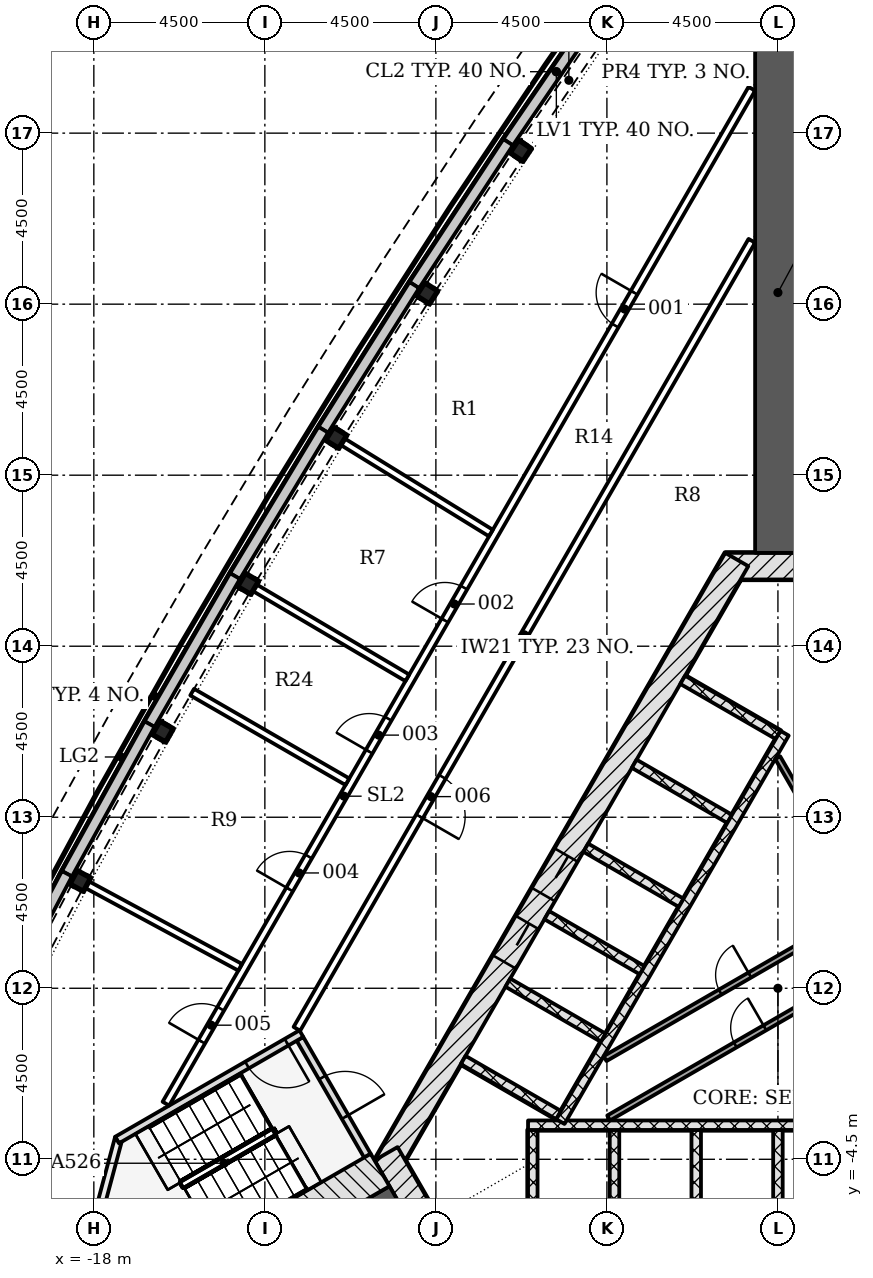
"""IFC4 building model, lengths in metres.
Left out: names, types, materials, properties, quantities, classifications, styles, units other than length and angle.
Written with IfcOpenShell. Run it as: python <this file> out.ifc"""

import sys

from ifc_helpers import new_model, si_unit, direction, frame, frame_2d, origin, origin_2d, place, context, subcontext, project, spatial, polyline, rectangle, i_section, outline, extrude, element, fill, save


model = new_model("IFC4")
c1 = context("Model", 3, precision=1e-05, world=origin(), true_north=direction((0.0, 1.0)))
c2 = subcontext(c1, "Body", "Model", "MODEL_VIEW")
j1 = project(units=[si_unit("LENGTHUNIT", "METRE"), si_unit("PLANEANGLEUNIT", "RADIAN")], contexts=[c1])
p1 = place(None, origin())
s1 = spatial("IfcSite", under=j1, at=p1, CompositionType="ELEMENT")
p2 = place(p1, origin())
s2 = spatial("IfcBuilding", under=s1, at=p2, CompositionType="ELEMENT")
p3 = place(p2, frame((0.0, 0.0, 52.8)))
s3 = spatial("IfcBuildingStorey", under=s2, at=p3, CompositionType="ELEMENT", Elevation=52.8)
p4 = place(p3, frame((1.386, 11.106, -0.3), z_axis=(0.0, 0.0, 1.0), x_axis=(-1.0, 0.0, 0.0)))
e1 = element("IfcWall", 1, at=p4, inside=s3, PredefinedType="SHEAR", context=c2, shape_type="SweptSolid", body=[
    extrude(rectangle(XDim=2.771, YDim=0.7, at=frame_2d((1.386, 0.0))), origin(), (0.0, 0.0, 1.0), 5.5),
])
p5 = place(p3, frame((-1.083, 11.281, -0.3), z_axis=(0.0, 0.0, 1.0), x_axis=(-0.500001446645, -0.866024568562, 0.0)))
e2 = element("IfcWall", 2, at=p5, inside=s3, PredefinedType="SHEAR", context=c2, shape_type="SweptSolid", body=[
    extrude(rectangle(XDim=18.458, YDim=0.7, at=frame_2d((9.229, 0.0))), origin(), (0.0, 0.0, 1.0), 5.5),
])
p6 = place(p5, frame((8.979, 0.0, 0.3)))
e3 = element("IfcOpeningElement", 3, at=p6, cuts=e2, PredefinedType="OPENING", context=c2, shape_type="SweptSolid", body=[
    extrude(rectangle(XDim=1.2, YDim=2.1, at=frame_2d((0.6, 1.05))), frame((0.0, 0.36, 0.0), z_axis=(0.0, -1.0, 0.0), x_axis=(1.0, 0.0, 0.0)), (0.0, 0.0, 1.0), 0.72),
])
p7 = place(p5, frame((11.029, 0.0, 0.3)))
e4 = element("IfcOpeningElement", 4, at=p7, cuts=e2, PredefinedType="OPENING", context=c2, shape_type="SweptSolid", body=[
    extrude(rectangle(XDim=1.2, YDim=2.1, at=frame_2d((0.6, 1.05))), frame((0.0, 0.36, 0.0), z_axis=(0.0, -1.0, 0.0), x_axis=(1.0, 0.0, 0.0)), (0.0, 0.0, 1.0), 0.72),
])
p8 = place(p3, frame((-10.311, -4.353, -0.3), z_axis=(0.0, 0.0, 1.0), x_axis=(0.500042739161, -0.866000726912, 0.0)))
e5 = element("IfcWall", 5, at=p8, inside=s3, PredefinedType="SHEAR", context=c2, shape_type="SweptSolid", body=[
    extrude(rectangle(XDim=2.771, YDim=0.7, at=frame_2d((1.386, 0.0))), origin(), (0.0, 0.0, 1.0), 5.5),
])
p9 = place(p3, frame((0.0, 11.456, -0.3), z_axis=(0.0, 0.0, 1.0), x_axis=(0.0, 1.0, 0.0)))
e6 = element("IfcWall", 6, at=p9, inside=s3, PredefinedType="SHEAR", context=c2, shape_type="SweptSolid", body=[
    extrude(rectangle(XDim=13.699, YDim=1.2, at=frame_2d((6.849, 0.0))), origin(), (0.0, 0.0, 1.0), 5.5),
])
p10 = place(p3, frame((-9.922, -5.728, -0.3), z_axis=(0.0, 0.0, 1.0), x_axis=(-0.866030067197, -0.499991922645, 0.0)))
e7 = element("IfcWall", 7, at=p10, inside=s3, PredefinedType="SHEAR", context=c2, shape_type="SweptSolid", body=[
    extrude(rectangle(XDim=13.698, YDim=1.2, at=frame_2d((6.849, 0.0))), origin(), (0.0, 0.0, 1.0), 5.5),
])
for number, where, z_axis, x_axis in (
    (8, (-6.768, 22.038, -0.3), (0.0, 0.0, 1.0), (-0.557, -0.831, 0.0)),
    (9, (-9.231, 18.285, -0.3), (0.0, 0.0, 1.0), (-0.541, -0.841, 0.0)),
    (10, (-11.623, 14.485, -0.3), (0.0, 0.0, 1.0), (-0.525, -0.851, 0.0)),
    (11, (-13.941, 10.641, -0.3), (0.0, 0.0, 1.0), (-0.508, -0.861, 0.0)),
    (12, (-16.186, 6.753, -0.3), (0.0, 0.0, 1.0), (-0.492, -0.871, 0.0)),
    (13, (-18.356, 2.823, -0.3), (0.0, 0.0, 1.0), (-0.475, -0.88, 0.0)),
):
    element("IfcColumn", number, at=place(p3, frame(where, z_axis=z_axis, x_axis=x_axis)), inside=s3, PredefinedType="COLUMN", context=c2, shape_type="SweptSolid", body=[
        extrude(i_section(OverallWidth=0.404, OverallDepth=0.406, WebThickness=0.027, FlangeThickness=0.044, FilletRadius=0.015, at=origin_2d()), origin(), (0.0, 0.0, 1.0), 5.5),
    ])
p11 = place(p3, origin())
e14 = element("IfcWall", 14, at=p11, inside=s3, PredefinedType="NOTDEFINED", context=c2, shape_type="SweptSolid", body=[
    extrude(outline(polyline([(-4.684, 26.058), (-7.225, 22.344), (-6.977, 22.175), (-4.436, 25.889), (-4.684, 26.058)])), origin(), (0.0, 0.0, 1.0), 1.2),
])
p12 = place(p3, origin())
e15 = element("IfcWall", 15, at=p12, inside=s3, PredefinedType="NOTDEFINED", context=c2, shape_type="SweptSolid", body=[
    extrude(outline(polyline([(-7.225, 22.344), (-9.694, 18.582), (-9.443, 18.418), (-6.974, 22.179), (-7.225, 22.344)])), origin(), (0.0, 0.0, 1.0), 1.2),
])
p13 = place(p3, origin())
e16 = element("IfcWall", 16, at=p13, inside=s3, PredefinedType="NOTDEFINED", context=c2, shape_type="SweptSolid", body=[
    extrude(outline(polyline([(-9.694, 18.582), (-12.091, 14.774), (-11.837, 14.614), (-9.44, 18.422), (-9.694, 18.582)])), origin(), (0.0, 0.0, 1.0), 1.2),
])
p14 = place(p3, origin())
e17 = element("IfcWall", 17, at=p14, inside=s3, PredefinedType="NOTDEFINED", context=c2, shape_type="SweptSolid", body=[
    extrude(outline(polyline([(-12.091, 14.774), (-14.415, 10.921), (-14.158, 10.766), (-11.834, 14.619), (-12.091, 14.774)])), origin(), (0.0, 0.0, 1.0), 1.2),
])
p15 = place(p3, origin())
e18 = element("IfcWall", 18, at=p15, inside=s3, PredefinedType="NOTDEFINED", context=c2, shape_type="SweptSolid", body=[
    extrude(outline(polyline([(-14.415, 10.921), (-16.665, 7.023), (-16.405, 6.874), (-14.155, 10.771), (-14.415, 10.921)])), origin(), (0.0, 0.0, 1.0), 1.2),
])
p16 = place(p3, origin())
e19 = element("IfcWall", 19, at=p16, inside=s3, PredefinedType="NOTDEFINED", context=c2, shape_type="SweptSolid", body=[
    extrude(outline(polyline([(-16.665, 7.023), (-18.84, 3.084), (-18.578, 2.939), (-16.402, 6.878), (-16.665, 7.023)])), origin(), (0.0, 0.0, 1.0), 1.2),
])
p17 = place(p3, origin())
e20 = element("IfcWall", 20, at=p17, inside=s3, PredefinedType="NOTDEFINED", context=c2, shape_type="SweptSolid", body=[
    extrude(outline(polyline([(-18.84, 3.084), (-20.94, -0.896), (-20.674, -1.036), (-18.575, 2.944), (-18.84, 3.084)])), origin(), (0.0, 0.0, 1.0), 1.2),
])
for number, where, z_axis, x_axis in (
    (21, (-6.45, -6.228, -0.3), (0.0, 0.0, 1.0), (0.0, 1.0, 0.0)),
    (22, (-4.3, -6.228, -0.3), (0.0, 0.0, 1.0), (0.0, 1.0, 0.0)),
    (23, (-2.15, -6.228, -0.3), (0.0, 0.0, 1.0), (0.0, 1.0, 0.0)),
    (24, (0.0, -6.228, -0.3), (0.0, 0.0, 1.0), (0.0, 1.0, 0.0)),
):
    element("IfcWall", number, at=place(p3, frame(where, z_axis=z_axis, x_axis=x_axis)), inside=s3, PredefinedType="PARTITIONING", context=c2, shape_type="SweptSolid", body=[
        extrude(rectangle(XDim=2.5, YDim=0.25, at=frame_2d((1.25, 0.0))), origin(), (0.0, 0.0, 1.0), 5.5),
    ])
p18 = place(p3, frame((-6.575, -3.603, 0.0), z_axis=(0.0, 0.0, 1.0), x_axis=(1.0, 0.0, 0.0)))
e25 = element("IfcWall", 25, at=p18, inside=s3, PredefinedType="PARTITIONING", context=c2, shape_type="SweptSolid", body=[
    extrude(rectangle(XDim=13.15, YDim=0.25, at=frame_2d((6.575, 0.0))), origin(), (0.0, 0.0, 1.0), 5.2),
])
p19 = place(p3, frame((-2.506, 8.115, -0.3), z_axis=(0.0, 0.0, 1.0), x_axis=(0.865996321171, -0.50005036918, 0.0)))
e26 = element("IfcWall", 26, at=p19, inside=s3, PredefinedType="PARTITIONING", context=c2, shape_type="SweptSolid", body=[
    extrude(rectangle(XDim=2.9, YDim=0.25, at=frame_2d((1.45, 0.0))), origin(), (0.0, 0.0, 1.0), 5.5),
])
for number, where, z_axis, x_axis in (
    (27, (-3.781, 5.907, -0.3), (0.0, 0.0, 1.0), (0.866, -0.5, 0.0)),
    (28, (-5.056, 3.699, -0.3), (0.0, 0.0, 1.0), (0.866, -0.5, 0.0)),
    (29, (-6.081, 1.923, -0.3), (0.0, 0.0, 1.0), (0.866, -0.5, 0.0)),
    (30, (-7.106, 0.148, -0.3), (0.0, 0.0, 1.0), (0.866, -0.5, 0.0)),
    (31, (-8.281, -1.887, -0.3), (0.0, 0.0, 1.0), (0.866, -0.5, 0.0)),
):
    element("IfcWall", number, at=place(p3, frame(where, z_axis=z_axis, x_axis=x_axis)), inside=s3, PredefinedType="PARTITIONING", context=c2, shape_type="SweptSolid", body=[
        extrude(rectangle(XDim=2.9, YDim=0.25, at=frame_2d((1.45, 0.0))), origin(), (0.0, 0.0, 1.0), 5.5),
    ])
p20 = place(p3, frame((0.176, 6.711, 0.0), z_axis=(0.0, 0.0, 1.0), x_axis=(-0.500004227369, -0.866022963098, 0.0)))
e32 = element("IfcWall", 32, at=p20, inside=s3, PredefinedType="PARTITIONING", context=c2, shape_type="SweptSolid", body=[
    extrude(rectangle(XDim=11.8, YDim=0.25, at=frame_2d((5.9, 0.0))), origin(), (0.0, 0.0, 1.0), 5.2),
])
p21 = place(p3, frame((-4.548, -1.851, 0.0), z_axis=(0.0, 0.0, 1.0), x_axis=(0.866023939251, 0.500002536638, 0.0)))
e33 = element("IfcWall", 33, at=p21, inside=s3, PredefinedType="PARTITIONING", context=c2, shape_type="SweptSolid", body=[
    extrude(rectangle(XDim=11.092, YDim=0.15, at=frame_2d((5.546, 0.0))), origin(), (0.0, 0.0, 1.0), 5.2),
])
p22 = place(p21, frame((3.497, 0.0, 0.0)))
e34 = element("IfcOpeningElement", 34, at=p22, cuts=e33, PredefinedType="OPENING", context=c2, shape_type="SweptSolid", body=[
    extrude(rectangle(XDim=0.9, YDim=2.1, at=frame_2d((0.45, 1.05))), frame((0.0, 0.085, 0.0), z_axis=(0.0, -1.0, 0.0), x_axis=(1.0, 0.0, 0.0)), (0.0, 0.0, 1.0), 0.17),
])
p23 = place(p3, frame((2.099, 2.42, 0.0), z_axis=(0.0, 0.0, 1.0), x_axis=(-0.499998449073, 0.866026299211, 0.0)))
e35 = element("IfcWall", 35, at=p23, inside=s3, PredefinedType="PARTITIONING", context=c2, shape_type="SweptSolid", body=[
    extrude(rectangle(XDim=4.211, YDim=0.15, at=frame_2d((2.106, 0.0))), origin(), (0.0, 0.0, 1.0), 5.2),
])
p24 = place(p3, frame((-4.454, -3.413, 0.0), z_axis=(0.0, 0.0, 1.0), x_axis=(0.86603043987, 0.499991277142, 0.0)))
e36 = element("IfcWall", 36, at=p24, inside=s3, PredefinedType="PARTITIONING", context=c2, shape_type="SweptSolid", body=[
    extrude(rectangle(XDim=11.792, YDim=0.15, at=frame_2d((5.896, 0.0))), origin(), (0.0, 0.0, 1.0), 5.2),
])
p25 = place(p24, frame((3.847, 0.0, 0.0)))
e37 = element("IfcOpeningElement", 37, at=p25, cuts=e36, PredefinedType="OPENING", context=c2, shape_type="SweptSolid", body=[
    extrude(rectangle(XDim=0.9, YDim=2.1, at=frame_2d((0.45, 1.05))), frame((0.0, 0.085, 0.0), z_axis=(0.0, -1.0, 0.0), x_axis=(1.0, 0.0, 0.0)), (0.0, 0.0, 1.0), 0.17),
])
p26 = place(p3, frame((-12.576, -1.331, -0.3), z_axis=(0.0, 0.0, 1.0), x_axis=(0.499970499736, -0.8660424351, 0.0)))
e38 = element("IfcWall", 38, at=p26, inside=s3, PredefinedType="SHEAR", context=c2, shape_type="SweptSolid", body=[
    extrude(rectangle(XDim=3.55, YDim=0.2, at=frame_2d((1.775, 0.0))), origin(), (0.0, 0.0, 1.0), 5.5),
])
p27 = place(p26, frame((1.175, 0.0, 0.3)))
e39 = element("IfcOpeningElement", 39, at=p27, cuts=e38, PredefinedType="OPENING", context=c2, shape_type="SweptSolid", body=[
    extrude(rectangle(XDim=1.2, YDim=2.1, at=frame_2d((0.6, 1.05))), frame((0.0, 0.11, 0.0), z_axis=(0.0, -1.0, 0.0), x_axis=(1.0, 0.0, 0.0)), (0.0, 0.0, 1.0), 0.22),
])
p28 = place(p3, frame((-12.539, -1.194, -0.3), z_axis=(0.0, 0.0, 1.0), x_axis=(-0.866045472092, -0.499965239061, 0.0)))
e40 = element("IfcWall", 40, at=p28, inside=s3, PredefinedType="SHEAR", context=c2, shape_type="SweptSolid", body=[
    extrude(rectangle(XDim=5.6, YDim=0.2, at=frame_2d((2.8, 0.0))), origin(), (0.0, 0.0, 1.0), 5.5),
])
p29 = place(p28, frame((0.45, 0.0, 0.3)))
e41 = element("IfcOpeningElement", 41, at=p29, cuts=e40, PredefinedType="OPENING", context=c2, shape_type="SweptSolid", body=[
    extrude(rectangle(XDim=1.2, YDim=2.1, at=frame_2d((0.6, 1.05))), frame((0.0, 0.11, 0.0), z_axis=(0.0, -1.0, 0.0), x_axis=(1.0, 0.0, 0.0)), (0.0, 0.0, 1.0), 0.22),
])
p30 = place(p3, frame((-10.468, -4.782, -0.3), z_axis=(0.0, 0.0, 1.0), x_axis=(-0.866018442252, -0.500012057535, 0.0)))
e42 = element("IfcWall", 42, at=p30, inside=s3, PredefinedType="SHEAR", context=c2, shape_type="SweptSolid", body=[
    extrude(rectangle(XDim=7.2, YDim=0.986, at=frame_2d((3.6, 0.0))), origin(), (0.0, 0.0, 1.0), 5.5),
])
p31 = place(p3, frame((0.0, 0.0, -0.3)))
e43 = element("IfcWall", 43, at=p31, inside=s3, PredefinedType="SHEAR", context=c2, shape_type="SweptSolid", body=[
    extrude(outline(polyline([(-17.439, -3.907), (-18.025, -6.093), (-16.95, -7.955), (-16.777, -7.855), (-17.81, -6.065), (-17.267, -4.039), (-17.339, -4.081), (-17.339, -4.081), (-17.339, -4.081), (-17.339, -4.081), (-17.339, -4.081), (-17.339, -4.081), (-17.339, -4.081), (-17.339, -4.081), (-17.339, -4.081), (-17.339, -4.081), (-17.339, -4.081), (-17.339, -4.081), (-17.339, -4.081), (-17.339, -4.081), (-17.339, -4.081), (-17.339, -4.081), (-17.339, -4.081), (-17.439, -3.907)])), origin(), (0.0, 0.0, 1.0), 5.5),
])
p32 = place(p3, frame((-0.687, 19.667, 0.0), z_axis=(0.0, 0.0, 1.0), x_axis=(-0.500000491645, -0.866025119933, 0.0)))
e44 = element("IfcWall", 44, at=p32, inside=s3, PredefinedType="PARTITIONING", context=c2, shape_type="SweptSolid", body=[
    extrude(rectangle(XDim=23.943, YDim=0.2, at=frame_2d((11.971, 0.0))), origin(), (0.0, 0.0, 1.0), 4.578),
])
p33 = place(p32, frame((16.287, 0.0, 0.0)))
e45 = element("IfcOpeningElement", 45, at=p33, cuts=e44, PredefinedType="OPENING", context=c2, shape_type="SweptSolid", body=[
    extrude(rectangle(XDim=1.2, YDim=2.1, at=frame_2d((0.6, 1.05))), frame((0.0, 0.11, 0.0), z_axis=(0.0, -1.0, 0.0), x_axis=(1.0, 0.0, 0.0)), (0.0, 0.0, 1.0), 0.22),
])
p34 = place(p3, frame((-16.104, -3.037, 0.0), z_axis=(0.0, 0.0, 1.0), x_axis=(0.500000029135, 0.866025386963, 0.0)))
e46 = element("IfcWall", 46, at=p34, inside=s3, PredefinedType="PARTITIONING", context=c2, shape_type="SweptSolid", body=[
    extrude(rectangle(XDim=30.835, YDim=0.2, at=frame_2d((15.417, 0.0))), origin(), (0.0, 0.0, 1.0), 4.578),
])
p35 = place(p34, frame((23.641, 0.0, 0.0)))
e47 = element("IfcOpeningElement", 47, at=p35, cuts=e46, PredefinedType="OPENING", context=c2, shape_type="SweptSolid", body=[
    extrude(rectangle(XDim=1.0, YDim=2.1, at=frame_2d((0.5, 1.05))), frame((0.0, 0.11, 0.0), z_axis=(0.0, -1.0, 0.0), x_axis=(1.0, 0.0, 0.0)), (0.0, 0.0, 1.0), 0.22),
])
p36 = place(p34, frame((14.681, 0.0, 0.0)))
e48 = element("IfcOpeningElement", 48, at=p36, cuts=e46, PredefinedType="OPENING", context=c2, shape_type="SweptSolid", body=[
    extrude(rectangle(XDim=1.0, YDim=2.1, at=frame_2d((0.5, 1.05))), frame((0.0, 0.11, 0.0), z_axis=(0.0, -1.0, 0.0), x_axis=(1.0, 0.0, 0.0)), (0.0, 0.0, 1.0), 0.22),
])
p37 = place(p34, frame((10.698, 0.0, 0.0)))
e49 = element("IfcOpeningElement", 49, at=p37, cuts=e46, PredefinedType="OPENING", context=c2, shape_type="SweptSolid", body=[
    extrude(rectangle(XDim=1.0, YDim=2.1, at=frame_2d((0.5, 1.05))), frame((0.0, 0.11, 0.0), z_axis=(0.0, -1.0, 0.0), x_axis=(1.0, 0.0, 0.0)), (0.0, 0.0, 1.0), 0.22),
])
p38 = place(p34, frame((6.51, 0.0, 0.0)))
e50 = element("IfcOpeningElement", 50, at=p38, cuts=e46, PredefinedType="OPENING", context=c2, shape_type="SweptSolid", body=[
    extrude(rectangle(XDim=1.0, YDim=2.1, at=frame_2d((0.5, 1.05))), frame((0.0, 0.11, 0.0), z_axis=(0.0, -1.0, 0.0), x_axis=(1.0, 0.0, 0.0)), (0.0, 0.0, 1.0), 0.22),
])
p39 = place(p34, frame((1.885, 0.0, 0.0)))
e51 = element("IfcOpeningElement", 51, at=p39, cuts=e46, PredefinedType="OPENING", context=c2, shape_type="SweptSolid", body=[
    extrude(rectangle(XDim=1.0, YDim=2.1, at=frame_2d((0.5, 1.05))), frame((0.0, 0.11, 0.0), z_axis=(0.0, -1.0, 0.0), x_axis=(1.0, 0.0, 0.0)), (0.0, 0.0, 1.0), 0.22),
])
p40 = place(p3, frame((-11.495, 14.407, 0.0), z_axis=(0.0, 0.0, 1.0), x_axis=(0.85135577801, -0.524588733437, 0.0)))
e52 = element("IfcWall", 52, at=p40, inside=s3, PredefinedType="PARTITIONING", context=c2, shape_type="SweptSolid", body=[
    extrude(rectangle(XDim=4.629, YDim=0.2, at=frame_2d((2.315, 0.0))), origin(), (0.0, 0.0, 1.0), 4.578),
])
p41 = place(p3, frame((-13.812, 10.565, 0.0), z_axis=(0.0, 0.0, 1.0), x_axis=(0.861211921062, -0.508246030009, 0.0)))
e53 = element("IfcWall", 53, at=p41, inside=s3, PredefinedType="PARTITIONING", context=c2, shape_type="SweptSolid", body=[
    extrude(rectangle(XDim=4.715, YDim=0.2, at=frame_2d((2.357, 0.0))), origin(), (0.0, 0.0, 1.0), 4.578),
])
p42 = place(p3, frame((-15.413, 7.793, 0.0), z_axis=(0.0, 0.0, 1.0), x_axis=(0.866023505087, -0.500003288626, 0.0)))
e54 = element("IfcWall", 54, at=p42, inside=s3, PredefinedType="PARTITIONING", context=c2, shape_type="SweptSolid", body=[
    extrude(rectangle(XDim=4.716, YDim=0.2, at=frame_2d((2.358, 0.0))), origin(), (0.0, 0.0, 1.0), 4.197),
])
p43 = place(p3, frame((-18.224, 2.752, 0.0), z_axis=(0.0, 0.0, 1.0), x_axis=(0.879981234657, -0.475008449032, 0.0)))
e55 = element("IfcWall", 55, at=p43, inside=s3, PredefinedType="PARTITIONING", context=c2, shape_type="SweptSolid", body=[
    extrude(rectangle(XDim=4.629, YDim=0.2, at=frame_2d((2.315, 0.0))), origin(), (0.0, 0.0, 1.0), 4.578),
])
p44 = place(p6, origin())
e56 = element("IfcDoor", 56, at=p44, inside=s3, OperationType="DOUBLE_DOOR_SLIDING", PredefinedType="DOOR", context=c2, shape_type="SweptSolid", body=[
    extrude(rectangle(XDim=1.2, YDim=2.1, at=frame_2d((0.6, 1.05))), frame((0.0, 0.025, 0.0), z_axis=(0.0, -1.0, 0.0), x_axis=(1.0, 0.0, 0.0)), (0.0, 0.0, 1.0), 0.05),
])
fill(e3, e56)
p45 = place(p7, origin())
e57 = element("IfcDoor", 57, at=p45, inside=s3, OperationType="DOUBLE_DOOR_SLIDING", PredefinedType="DOOR", context=c2, shape_type="SweptSolid", body=[
    extrude(rectangle(XDim=1.2, YDim=2.1, at=frame_2d((0.6, 1.05))), frame((0.0, 0.025, 0.0), z_axis=(0.0, -1.0, 0.0), x_axis=(1.0, 0.0, 0.0)), (0.0, 0.0, 1.0), 0.05),
])
fill(e4, e57)
p46 = place(p25, origin())
e58 = element("IfcDoor", 58, at=p46, inside=s3, OperationType="SINGLE_SWING_RIGHT", PredefinedType="DOOR", context=c2, shape_type="SweptSolid", body=[
    extrude(rectangle(XDim=0.9, YDim=2.1, at=frame_2d((0.45, 1.05))), frame((0.0, 0.025, 0.0), z_axis=(0.0, -1.0, 0.0), x_axis=(1.0, 0.0, 0.0)), (0.0, 0.0, 1.0), 0.05),
])
fill(e37, e58)
p47 = place(p22, origin())
e59 = element("IfcDoor", 59, at=p47, inside=s3, OperationType="SINGLE_SWING_RIGHT", PredefinedType="DOOR", context=c2, shape_type="SweptSolid", body=[
    extrude(rectangle(XDim=0.9, YDim=2.1, at=frame_2d((0.45, 1.05))), frame((0.0, 0.025, 0.0), z_axis=(0.0, -1.0, 0.0), x_axis=(1.0, 0.0, 0.0)), (0.0, 0.0, 1.0), 0.05),
])
fill(e34, e59)
p48 = place(p27, origin())
e60 = element("IfcDoor", 60, at=p48, inside=s3, OperationType="SINGLE_SWING_RIGHT", PredefinedType="DOOR", context=c2, shape_type="SweptSolid", body=[
    extrude(rectangle(XDim=1.2, YDim=2.1, at=frame_2d((0.6, 1.05))), frame((0.0, 0.025, 0.0), z_axis=(0.0, -1.0, 0.0), x_axis=(1.0, 0.0, 0.0)), (0.0, 0.0, 1.0), 0.05),
])
fill(e39, e60)
p49 = place(p29, origin())
e61 = element("IfcDoor", 61, at=p49, inside=s3, OperationType="SINGLE_SWING_LEFT", PredefinedType="DOOR", context=c2, shape_type="SweptSolid", body=[
    extrude(rectangle(XDim=1.2, YDim=2.1, at=frame_2d((0.6, 1.05))), frame((0.0, 0.025, 0.0), z_axis=(0.0, -1.0, 0.0), x_axis=(1.0, 0.0, 0.0)), (0.0, 0.0, 1.0), 0.05),
])
fill(e41, e61)
p50 = place(p35, origin())
e62 = element("IfcDoor", 62, at=p50, inside=s3, OperationType="SINGLE_SWING_RIGHT", PredefinedType="DOOR", context=c2, shape_type="SweptSolid", body=[
    extrude(rectangle(XDim=1.0, YDim=2.1, at=frame_2d((0.5, 1.05))), frame((0.0, 0.025, 0.0), z_axis=(0.0, -1.0, 0.0), x_axis=(1.0, 0.0, 0.0)), (0.0, 0.0, 1.0), 0.05),
])
fill(e47, e62)
p51 = place(p36, origin())
e63 = element("IfcDoor", 63, at=p51, inside=s3, OperationType="SINGLE_SWING_LEFT", PredefinedType="DOOR", context=c2, shape_type="SweptSolid", body=[
    extrude(rectangle(XDim=1.0, YDim=2.1, at=frame_2d((0.5, 1.05))), frame((0.0, 0.025, 0.0), z_axis=(0.0, -1.0, 0.0), x_axis=(1.0, 0.0, 0.0)), (0.0, 0.0, 1.0), 0.05),
])
fill(e48, e63)
p52 = place(p37, origin())
e64 = element("IfcDoor", 64, at=p52, inside=s3, OperationType="SINGLE_SWING_LEFT", PredefinedType="DOOR", context=c2, shape_type="SweptSolid", body=[
    extrude(rectangle(XDim=1.0, YDim=2.1, at=frame_2d((0.5, 1.05))), frame((0.0, 0.025, 0.0), z_axis=(0.0, -1.0, 0.0), x_axis=(1.0, 0.0, 0.0)), (0.0, 0.0, 1.0), 0.05),
])
fill(e49, e64)
p53 = place(p38, origin())
e65 = element("IfcDoor", 65, at=p53, inside=s3, OperationType="SINGLE_SWING_LEFT", PredefinedType="DOOR", context=c2, shape_type="SweptSolid", body=[
    extrude(rectangle(XDim=1.0, YDim=2.1, at=frame_2d((0.5, 1.05))), frame((0.0, 0.025, 0.0), z_axis=(0.0, -1.0, 0.0), x_axis=(1.0, 0.0, 0.0)), (0.0, 0.0, 1.0), 0.05),
])
fill(e50, e65)
p54 = place(p39, origin())
e66 = element("IfcDoor", 66, at=p54, inside=s3, OperationType="SINGLE_SWING_LEFT", PredefinedType="DOOR", context=c2, shape_type="SweptSolid", body=[
    extrude(rectangle(XDim=1.0, YDim=2.1, at=frame_2d((0.5, 1.05))), frame((0.0, 0.025, 0.0), z_axis=(0.0, -1.0, 0.0), x_axis=(1.0, 0.0, 0.0)), (0.0, 0.0, 1.0), 0.05),
])
fill(e51, e66)
p55 = place(p33, origin())
e67 = element("IfcDoor", 67, at=p55, inside=s3, OperationType="SINGLE_SWING_RIGHT", PredefinedType="DOOR", context=c2, shape_type="SweptSolid", body=[
    extrude(rectangle(XDim=1.2, YDim=2.1, at=frame_2d((0.6, 1.05))), frame((0.0, 0.025, 0.0), z_axis=(0.0, -1.0, 0.0), x_axis=(1.0, 0.0, 0.0)), (0.0, 0.0, 1.0), 0.05),
])
fill(e45, e67)
save(model, sys.argv[1])
